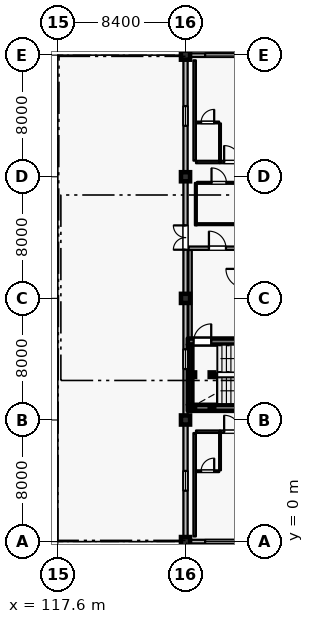
"""IFC4 building model, lengths in metres.
Left out: names, types, materials, properties, quantities, classifications, styles, units other than length and angle.
Written with IfcOpenShell. Run it as: python <this file> out.ifc"""

import sys

from ifc_helpers import new_model, si_unit, direction, frame, frame_2d, origin, origin_2d, place, context, subcontext, project, spatial, rectangle, hollow_rectangle, extrude, element, fill, save


model = new_model("IFC4")
c1 = context("Model", 3, precision=1e-05, world=origin(), true_north=direction((0.0, 1.0)))
c2 = subcontext(c1, "Body", "Model", "MODEL_VIEW")
j1 = project(units=[si_unit("LENGTHUNIT", "METRE"), si_unit("PLANEANGLEUNIT", "RADIAN")], contexts=[c1])
p1 = place(None, origin())
s1 = spatial("IfcSite", under=j1, at=p1, CompositionType="ELEMENT")
p2 = place(p1, origin())
s2 = spatial("IfcBuilding", under=s1, at=p2, CompositionType="ELEMENT")
p3 = place(p2, frame((0.0, 0.0, 43.2)))
s3 = spatial("IfcBuildingStorey", under=s2, at=p3, CompositionType="ELEMENT", Elevation=43.2)
for number, where, z_axis, x_axis in (
    (1, (126.0, 0.0, 0.0), (0.0, 0.0, 1.0), (1.0, 0.0, 0.0)),
    (2, (126.0, 16.0, 0.0), (0.0, 0.0, 1.0), (1.0, 0.0, 0.0)),
    (3, (126.0, 32.0, 0.0), (0.0, 0.0, 1.0), (1.0, 0.0, 0.0)),
    (4, (126.0, 8.0, 0.0), (0.0, 0.0, 1.0), (1.0, 0.0, 0.0)),
    (5, (126.0, 24.0, 0.0), (0.0, 0.0, 1.0), (1.0, 0.0, 0.0)),
):
    element("IfcColumn", number, at=place(p3, frame(where, z_axis=z_axis, x_axis=x_axis)), inside=s3, PredefinedType="COLUMN", context=c2, shape_type="SweptSolid", body=[
        extrude(rectangle(XDim=0.6, YDim=0.6, at=origin_2d()), origin(), (0.0, 0.0, 1.0), 4.2),
    ])
p4 = place(p3, frame((134.1, 0.0, 0.0), z_axis=(0.0, 0.0, 1.0), x_axis=(-1.0, 0.0, 0.0)))
e6 = element("IfcWall", 6, at=p4, inside=s3, PredefinedType="SOLIDWALL", context=c2, shape_type="SweptSolid", body=[
    extrude(rectangle(XDim=7.8, YDim=0.24, at=frame_2d((3.9, 0.0))), origin(), (0.0, 0.0, 1.0), 3.54),
])
p5 = place(p4, frame((1.675, 0.0, 0.0)))
e7 = element("IfcOpeningElement", 7, at=p5, cuts=e6, PredefinedType="OPENING", context=c2, shape_type="SweptSolid", body=[
    extrude(rectangle(XDim=1.5, YDim=2.25, at=frame_2d((0.75, 1.125))), frame((0.0, 0.13, 0.0), z_axis=(0.0, -1.0, 0.0), x_axis=(1.0, 0.0, 0.0)), (0.0, 0.0, 1.0), 0.26),
])
p6 = place(p4, frame((4.81, 0.0, 0.8)))
e8 = element("IfcOpeningElement", 8, at=p6, cuts=e6, PredefinedType="OPENING", context=c2, shape_type="SweptSolid", body=[
    extrude(rectangle(XDim=2.0, YDim=1.75, at=frame_2d((1.0, 0.875))), frame((0.0, 0.13, 0.0), z_axis=(0.0, -1.0, 0.0), x_axis=(1.0, 0.0, 0.0)), (0.0, 0.0, 1.0), 0.26),
])
p7 = place(p3, frame((126.3, 32.0, 0.0), z_axis=(0.0, 0.0, 1.0), x_axis=(1.0, 0.0, 0.0)))
e9 = element("IfcWall", 9, at=p7, inside=s3, PredefinedType="SOLIDWALL", context=c2, shape_type="SweptSolid", body=[
    extrude(rectangle(XDim=7.8, YDim=0.24, at=frame_2d((3.9, 0.0))), origin(), (0.0, 0.0, 1.0), 3.54),
])
p8 = place(p7, frame((0.99, 0.0, 0.8)))
e10 = element("IfcOpeningElement", 10, at=p8, cuts=e9, PredefinedType="OPENING", context=c2, shape_type="SweptSolid", body=[
    extrude(rectangle(XDim=2.0, YDim=1.75, at=frame_2d((1.0, 0.875))), frame((0.0, 0.13, 0.0), z_axis=(0.0, -1.0, 0.0), x_axis=(1.0, 0.0, 0.0)), (0.0, 0.0, 1.0), 0.26),
])
p9 = place(p7, frame((4.375, 0.0, 0.8)))
e11 = element("IfcOpeningElement", 11, at=p9, cuts=e9, PredefinedType="OPENING", context=c2, shape_type="SweptSolid", body=[
    extrude(rectangle(XDim=2.0, YDim=1.75, at=frame_2d((1.0, 0.875))), frame((0.0, 0.13, 0.0), z_axis=(0.0, -1.0, 0.0), x_axis=(1.0, 0.0, 0.0)), (0.0, 0.0, 1.0), 0.26),
])
p10 = place(p3, frame((126.0, 0.3, 0.0), z_axis=(0.0, 0.0, 1.0), x_axis=(0.0, 1.0, 0.0)))
e12 = element("IfcWall", 12, at=p10, inside=s3, PredefinedType="SOLIDWALL", context=c2, shape_type="SweptSolid", body=[
    extrude(rectangle(XDim=7.4, YDim=0.28, at=frame_2d((3.7, 0.0))), origin(), (0.0, 0.0, 1.0), 3.3),
])
p11 = place(p10, frame((3.05, 0.0, 0.75)))
e13 = element("IfcOpeningElement", 13, at=p11, cuts=e12, PredefinedType="OPENING", context=c2, shape_type="SweptSolid", body=[
    extrude(rectangle(XDim=1.3, YDim=1.65, at=frame_2d((0.65, 0.825))), frame((0.0, 0.15, 0.0), z_axis=(0.0, -1.0, 0.0), x_axis=(1.0, 0.0, 0.0)), (0.0, 0.0, 1.0), 0.3),
])
p12 = place(p3, frame((126.0, 8.3, 0.0), z_axis=(0.0, 0.0, 1.0), x_axis=(0.0, 1.0, 0.0)))
e14 = element("IfcWall", 14, at=p12, inside=s3, PredefinedType="SOLIDWALL", context=c2, shape_type="SweptSolid", body=[
    extrude(rectangle(XDim=7.4, YDim=0.28, at=frame_2d((3.7, 0.0))), origin(), (0.0, 0.0, 1.0), 3.3),
])
p13 = place(p12, frame((3.05, 0.0, 0.75)))
e15 = element("IfcOpeningElement", 15, at=p13, cuts=e14, PredefinedType="OPENING", context=c2, shape_type="SweptSolid", body=[
    extrude(rectangle(XDim=1.3, YDim=1.65, at=frame_2d((0.65, 0.825))), frame((0.0, 0.15, 0.0), z_axis=(0.0, -1.0, 0.0), x_axis=(1.0, 0.0, 0.0)), (0.0, 0.0, 1.0), 0.3),
])
p14 = place(p3, frame((126.0, 16.3, 0.0), z_axis=(0.0, 0.0, 1.0), x_axis=(0.0, 1.0, 0.0)))
e16 = element("IfcWall", 16, at=p14, inside=s3, PredefinedType="SOLIDWALL", context=c2, shape_type="SweptSolid", body=[
    extrude(rectangle(XDim=7.4, YDim=0.28, at=frame_2d((3.7, 0.0))), origin(), (0.0, 0.0, 1.0), 3.3),
])
p15 = place(p14, frame((2.9, 0.0, 0.0)))
e17 = element("IfcOpeningElement", 17, at=p15, cuts=e16, PredefinedType="OPENING", context=c2, shape_type="SweptSolid", body=[
    extrude(rectangle(XDim=1.6, YDim=2.25, at=frame_2d((0.8, 1.125))), frame((0.0, 0.15, 0.0), z_axis=(0.0, -1.0, 0.0), x_axis=(1.0, 0.0, 0.0)), (0.0, 0.0, 1.0), 0.3),
])
p16 = place(p3, frame((126.0, 24.3, 0.0), z_axis=(0.0, 0.0, 1.0), x_axis=(0.0, 1.0, 0.0)))
e18 = element("IfcWall", 18, at=p16, inside=s3, PredefinedType="SOLIDWALL", context=c2, shape_type="SweptSolid", body=[
    extrude(rectangle(XDim=7.4, YDim=0.28, at=frame_2d((3.7, 0.0))), origin(), (0.0, 0.0, 1.0), 3.3),
])
p17 = place(p16, frame((3.05, 0.0, 0.75)))
e19 = element("IfcOpeningElement", 19, at=p17, cuts=e18, PredefinedType="OPENING", context=c2, shape_type="SweptSolid", body=[
    extrude(rectangle(XDim=1.3, YDim=1.65, at=frame_2d((0.65, 0.825))), frame((0.0, 0.15, 0.0), z_axis=(0.0, -1.0, 0.0), x_axis=(1.0, 0.0, 0.0)), (0.0, 0.0, 1.0), 0.3),
])
p18 = place(p3, frame((126.15, 8.8, 0.0), z_axis=(0.0, 0.0, 1.0), x_axis=(1.0, 0.0, 0.0)))
e20 = element("IfcWall", 20, at=p18, inside=s3, PredefinedType="SHEAR", context=c2, shape_type="SweptSolid", body=[
    extrude(rectangle(XDim=8.15, YDim=0.4, at=frame_2d((4.075, 0.0))), origin(), (0.0, 0.0, 1.0), 3.935),
])
p19 = place(p3, frame((126.15, 13.16, 0.0), z_axis=(0.0, 0.0, 1.0), x_axis=(1.0, 0.0, 0.0)))
e21 = element("IfcWall", 21, at=p19, inside=s3, PredefinedType="SHEAR", context=c2, shape_type="SweptSolid", body=[
    extrude(rectangle(XDim=8.15, YDim=0.4, at=frame_2d((4.075, 0.0))), origin(), (0.0, 0.0, 1.0), 3.935),
])
p20 = place(p19, frame((0.38, 0.0, 0.0)))
e22 = element("IfcOpeningElement", 22, at=p20, cuts=e21, PredefinedType="OPENING", context=c2, shape_type="SweptSolid", body=[
    extrude(rectangle(XDim=1.16, YDim=2.2, at=frame_2d((0.58, 1.1))), frame((0.0, 0.21, 0.0), z_axis=(0.0, -1.0, 0.0), x_axis=(1.0, 0.0, 0.0)), (0.0, 0.0, 1.0), 0.42),
])
p21 = place(p3, frame((126.3, 9.005, 0.0), z_axis=(0.0, 0.0, 1.0), x_axis=(0.0, 1.0, 0.0)))
e23 = element("IfcWall", 23, at=p21, inside=s3, PredefinedType="SHEAR", context=c2, shape_type="SweptSolid", body=[
    extrude(rectangle(XDim=3.95, YDim=0.3, at=frame_2d((1.975, 0.0))), origin(), (0.0, 0.0, 1.0), 3.935),
])
p22 = place(p3, frame((126.3, 13.365, 0.0), z_axis=(0.0, 0.0, 1.0), x_axis=(0.0, 1.0, 0.0)))
e24 = element("IfcWall", 24, at=p22, inside=s3, PredefinedType="PARTITIONING", context=c2, shape_type="SweptSolid", body=[
    extrude(rectangle(XDim=5.82, YDim=0.22, at=frame_2d((2.91, 0.0))), origin(), (0.0, 0.0, 1.0), 3.935),
])
p23 = place(p3, frame((126.19, 19.3, 0.0), z_axis=(0.0, 0.0, 1.0), x_axis=(1.0, 0.0, 0.0)))
e25 = element("IfcWall", 25, at=p23, inside=s3, PredefinedType="PARTITIONING", context=c2, shape_type="SweptSolid", body=[
    extrude(rectangle(XDim=3.82, YDim=0.22, at=frame_2d((1.91, 0.0))), origin(), (0.0, 0.0, 1.0), 3.935),
])
p24 = place(p23, frame((1.35, 0.0, 0.0)))
e26 = element("IfcOpeningElement", 26, at=p24, cuts=e25, PredefinedType="OPENING", context=c2, shape_type="SweptSolid", body=[
    extrude(rectangle(XDim=1.12, YDim=2.2, at=frame_2d((0.56, 1.1))), frame((0.0, 0.12, 0.0), z_axis=(0.0, -1.0, 0.0), x_axis=(1.0, 0.0, 0.0)), (0.0, 0.0, 1.0), 0.24),
])
for number, where, z_axis, x_axis in (
    (27, (126.48, 8.8, 0.0), (0.0, 0.0, 1.0), (1.0, 0.0, 0.0)),
    (28, (126.48, 10.98, 0.0), (0.0, 0.0, 1.0), (1.0, 0.0, 0.0)),
    (29, (127.74, 8.8, 0.0), (0.0, 0.0, 1.0), (1.0, 0.0, 0.0)),
    (30, (127.74, 10.98, 0.0), (0.0, 0.0, 1.0), (1.0, 0.0, 0.0)),
):
    element("IfcColumn", number, at=place(p3, frame(where, z_axis=z_axis, x_axis=x_axis)), inside=s3, PredefinedType="COLUMN", context=c2, shape_type="SweptSolid", body=[
        extrude(hollow_rectangle(XDim=0.3, YDim=0.3, WallThickness=0.012, at=origin_2d()), origin(), (0.0, 0.0, 1.0), 4.02),
    ])
p25 = place(p3, frame((126.69, 24.97, 0.0), z_axis=(0.0, 0.0, 1.0), x_axis=(1.0, 0.0, 0.0)))
e31 = element("IfcWall", 31, at=p25, inside=s3, PredefinedType="PARTITIONING", context=c2, shape_type="SweptSolid", body=[
    extrude(rectangle(XDim=1.57, YDim=0.16, at=frame_2d((0.785, 0.0))), origin(), (0.0, 0.0, 1.0), 3.935),
])
p26 = place(p3, frame((128.27, 24.97, 0.0), z_axis=(0.0, 0.0, 1.0), x_axis=(1.0, 0.0, 0.0)))
e32 = element("IfcWall", 32, at=p26, inside=s3, PredefinedType="PARTITIONING", context=c2, shape_type="SweptSolid", body=[
    extrude(rectangle(XDim=1.62, YDim=0.16, at=frame_2d((0.81, 0.0))), origin(), (0.0, 0.0, 1.0), 3.935),
])
p27 = place(p26, frame((0.27, 0.0, 0.0)))
e33 = element("IfcOpeningElement", 33, at=p27, cuts=e32, PredefinedType="OPENING", context=c2, shape_type="SweptSolid", body=[
    extrude(rectangle(XDim=1.08, YDim=2.3, at=frame_2d((0.54, 1.15))), frame((0.0, 0.09, 0.0), z_axis=(0.0, -1.0, 0.0), x_axis=(1.0, 0.0, 0.0)), (0.0, 0.0, 1.0), 0.18),
])
p28 = place(p3, frame((128.27, 25.06, 0.0), z_axis=(0.0, 0.0, 1.0), x_axis=(0.0, 1.0, 0.0)))
e34 = element("IfcWall", 34, at=p28, inside=s3, PredefinedType="PARTITIONING", context=c2, shape_type="SweptSolid", body=[
    extrude(rectangle(XDim=2.45, YDim=0.115, at=frame_2d((1.225, 0.0))), origin(), (0.0, 0.0, 1.0), 3.935),
])
p29 = place(p3, frame((126.7, 27.57, 0.0), z_axis=(0.0, 0.0, 1.0), x_axis=(1.0, 0.0, 0.0)))
e35 = element("IfcWall", 35, at=p29, inside=s3, PredefinedType="PARTITIONING", context=c2, shape_type="SweptSolid", body=[
    extrude(rectangle(XDim=1.51, YDim=0.115, at=frame_2d((0.755, 0.0))), origin(), (0.0, 0.0, 1.0), 3.935),
])
p30 = place(p29, frame((0.325, 0.0, 0.0)))
e36 = element("IfcOpeningElement", 36, at=p30, cuts=e35, PredefinedType="OPENING", context=c2, shape_type="SweptSolid", body=[
    extrude(rectangle(XDim=0.86, YDim=2.12, at=frame_2d((0.43, 1.06))), frame((0.0, 0.067, 0.0), z_axis=(0.0, -1.0, 0.0), x_axis=(1.0, 0.0, 0.0)), (0.0, 0.0, 1.0), 0.135),
])
p31 = place(p3, frame((126.6, 25.06, 0.0), z_axis=(0.0, 0.0, 1.0), x_axis=(0.0, 1.0, 0.0)))
e37 = element("IfcWall", 37, at=p31, inside=s3, PredefinedType="PARTITIONING", context=c2, shape_type="SweptSolid", body=[
    extrude(rectangle(XDim=6.6, YDim=0.16, at=frame_2d((3.3, 0.0))), origin(), (0.0, 0.0, 1.0), 3.935),
])
p32 = place(p3, frame((126.69, 7.23, 0.0), z_axis=(0.0, 0.0, 1.0), x_axis=(1.0, 0.0, 0.0)))
e38 = element("IfcWall", 38, at=p32, inside=s3, PredefinedType="PARTITIONING", context=c2, shape_type="SweptSolid", body=[
    extrude(rectangle(XDim=1.57, YDim=0.16, at=frame_2d((0.785, 0.0))), origin(), (0.0, 0.0, 1.0), 3.935),
])
p33 = place(p3, frame((128.27, 7.23, 0.0), z_axis=(0.0, 0.0, 1.0), x_axis=(1.0, 0.0, 0.0)))
e39 = element("IfcWall", 39, at=p33, inside=s3, PredefinedType="PARTITIONING", context=c2, shape_type="SweptSolid", body=[
    extrude(rectangle(XDim=1.62, YDim=0.16, at=frame_2d((0.81, 0.0))), origin(), (0.0, 0.0, 1.0), 3.935),
])
p34 = place(p33, frame((0.27, 0.0, 0.0)))
e40 = element("IfcOpeningElement", 40, at=p34, cuts=e39, PredefinedType="OPENING", context=c2, shape_type="SweptSolid", body=[
    extrude(rectangle(XDim=1.08, YDim=2.3, at=frame_2d((0.54, 1.15))), frame((0.0, 0.09, 0.0), z_axis=(0.0, -1.0, 0.0), x_axis=(1.0, 0.0, 0.0)), (0.0, 0.0, 1.0), 0.18),
])
p35 = place(p3, frame((128.27, 4.69, 0.0), z_axis=(0.0, 0.0, 1.0), x_axis=(0.0, 1.0, 0.0)))
e41 = element("IfcWall", 41, at=p35, inside=s3, PredefinedType="PARTITIONING", context=c2, shape_type="SweptSolid", body=[
    extrude(rectangle(XDim=2.45, YDim=0.115, at=frame_2d((1.225, 0.0))), origin(), (0.0, 0.0, 1.0), 3.935),
])
p36 = place(p3, frame((126.7, 4.63, 0.0), z_axis=(0.0, 0.0, 1.0), x_axis=(1.0, 0.0, 0.0)))
e42 = element("IfcWall", 42, at=p36, inside=s3, PredefinedType="PARTITIONING", context=c2, shape_type="SweptSolid", body=[
    extrude(rectangle(XDim=1.51, YDim=0.115, at=frame_2d((0.755, 0.0))), origin(), (0.0, 0.0, 1.0), 3.935),
])
p37 = place(p36, frame((0.325, 0.0, 0.0)))
e43 = element("IfcOpeningElement", 43, at=p37, cuts=e42, PredefinedType="OPENING", context=c2, shape_type="SweptSolid", body=[
    extrude(rectangle(XDim=0.86, YDim=2.12, at=frame_2d((0.43, 1.06))), frame((0.0, 0.067, 0.0), z_axis=(0.0, -1.0, 0.0), x_axis=(1.0, 0.0, 0.0)), (0.0, 0.0, 1.0), 0.135),
])
p38 = place(p3, frame((126.6, 0.34, 0.0), z_axis=(0.0, 0.0, 1.0), x_axis=(0.0, 1.0, 0.0)))
e44 = element("IfcWall", 44, at=p38, inside=s3, PredefinedType="PARTITIONING", context=c2, shape_type="SweptSolid", body=[
    extrude(rectangle(XDim=6.8, YDim=0.16, at=frame_2d((3.4, 0.0))), origin(), (0.0, 0.0, 1.0), 3.935),
])
p39 = place(p3, frame((126.76, 23.6, 0.0), z_axis=(0.0, 0.0, 1.0), x_axis=(1.0, 0.0, 0.0)))
e45 = element("IfcWall", 45, at=p39, inside=s3, PredefinedType="PARTITIONING", context=c2, shape_type="SweptSolid", body=[
    extrude(rectangle(XDim=2.88, YDim=0.125, at=frame_2d((1.44, 0.0))), origin(), (0.0, 0.0, 1.0), 3.935),
])
p40 = place(p39, frame((0.95, 0.0, 0.0)))
e46 = element("IfcOpeningElement", 46, at=p40, cuts=e45, PredefinedType="OPENING", context=c2, shape_type="SweptSolid", body=[
    extrude(rectangle(XDim=0.98, YDim=2.15, at=frame_2d((0.49, 1.075))), frame((0.0, 0.073, 0.0), z_axis=(0.0, -1.0, 0.0), x_axis=(1.0, 0.0, 0.0)), (0.0, 0.0, 1.0), 0.145),
])
p41 = place(p3, frame((126.68, 20.8, 0.0), z_axis=(0.0, 0.0, 1.0), x_axis=(0.0, 1.0, 0.0)))
e47 = element("IfcWall", 47, at=p41, inside=s3, PredefinedType="PARTITIONING", context=c2, shape_type="SweptSolid", body=[
    extrude(rectangle(XDim=2.796, YDim=0.125, at=frame_2d((1.398, 0.0))), origin(), (0.0, 0.0, 1.0), 3.935),
])
p42 = place(p3, frame((126.742, 20.88, 0.0), z_axis=(0.0, 0.0, 1.0), x_axis=(1.0, 0.0, 0.0)))
e48 = element("IfcWall", 48, at=p42, inside=s3, PredefinedType="PARTITIONING", context=c2, shape_type="SweptSolid", body=[
    extrude(rectangle(XDim=2.915, YDim=0.125, at=frame_2d((1.458, 0.0))), origin(), (0.0, 0.0, 1.0), 3.935),
])
p43 = place(p6, origin())
e49 = element("IfcWindow", 49, at=p43, inside=s3, PartitioningType="DOUBLE_PANEL_VERTICAL", PredefinedType="WINDOW", context=c2, shape_type="SweptSolid", body=[
    extrude(rectangle(XDim=2.0, YDim=1.75, at=frame_2d((1.0, 0.875))), frame((0.0, 0.03, 0.0), z_axis=(0.0, -1.0, 0.0), x_axis=(1.0, 0.0, 0.0)), (0.0, 0.0, 1.0), 0.06),
])
fill(e8, e49)
p44 = place(p8, origin())
e50 = element("IfcWindow", 50, at=p44, inside=s3, PartitioningType="DOUBLE_PANEL_VERTICAL", PredefinedType="WINDOW", context=c2, shape_type="SweptSolid", body=[
    extrude(rectangle(XDim=2.0, YDim=1.75, at=frame_2d((1.0, 0.875))), frame((0.0, 0.03, 0.0), z_axis=(0.0, -1.0, 0.0), x_axis=(1.0, 0.0, 0.0)), (0.0, 0.0, 1.0), 0.06),
])
fill(e10, e50)
p45 = place(p11, origin())
e51 = element("IfcWindow", 51, at=p45, inside=s3, PartitioningType="SINGLE_PANEL", PredefinedType="WINDOW", context=c2, shape_type="SweptSolid", body=[
    extrude(rectangle(XDim=1.3, YDim=1.65, at=frame_2d((0.65, 0.825))), frame((0.0, 0.03, 0.0), z_axis=(0.0, -1.0, 0.0), x_axis=(1.0, 0.0, 0.0)), (0.0, 0.0, 1.0), 0.06),
])
fill(e13, e51)
p46 = place(p13, origin())
e52 = element("IfcWindow", 52, at=p46, inside=s3, PartitioningType="SINGLE_PANEL", PredefinedType="WINDOW", context=c2, shape_type="SweptSolid", body=[
    extrude(rectangle(XDim=1.3, YDim=1.65, at=frame_2d((0.65, 0.825))), frame((0.0, 0.03, 0.0), z_axis=(0.0, -1.0, 0.0), x_axis=(1.0, 0.0, 0.0)), (0.0, 0.0, 1.0), 0.06),
])
fill(e15, e52)
p47 = place(p15, origin())
e53 = element("IfcDoor", 53, at=p47, inside=s3, OperationType="DOUBLE_DOOR_SINGLE_SWING", PredefinedType="DOOR", context=c2, shape_type="SweptSolid", body=[
    extrude(rectangle(XDim=1.6, YDim=2.25, at=frame_2d((0.8, 1.125))), frame((0.0, 0.025, 0.0), z_axis=(0.0, -1.0, 0.0), x_axis=(1.0, 0.0, 0.0)), (0.0, 0.0, 1.0), 0.05),
])
fill(e17, e53)
p48 = place(p17, origin())
e54 = element("IfcWindow", 54, at=p48, inside=s3, PartitioningType="SINGLE_PANEL", PredefinedType="WINDOW", context=c2, shape_type="SweptSolid", body=[
    extrude(rectangle(XDim=1.3, YDim=1.65, at=frame_2d((0.65, 0.825))), frame((0.0, 0.03, 0.0), z_axis=(0.0, -1.0, 0.0), x_axis=(1.0, 0.0, 0.0)), (0.0, 0.0, 1.0), 0.06),
])
fill(e19, e54)
p49 = place(p20, origin())
e55 = element("IfcDoor", 55, at=p49, inside=s3, OperationType="SINGLE_SWING_RIGHT", PredefinedType="DOOR", context=c2, shape_type="SweptSolid", body=[
    extrude(rectangle(XDim=1.16, YDim=2.2, at=frame_2d((0.58, 1.1))), frame((0.0, 0.025, 0.0), z_axis=(0.0, -1.0, 0.0), x_axis=(1.0, 0.0, 0.0)), (0.0, 0.0, 1.0), 0.05),
])
fill(e22, e55)
p50 = place(p24, origin())
e56 = element("IfcDoor", 56, at=p50, inside=s3, OperationType="SINGLE_SWING_LEFT", PredefinedType="DOOR", context=c2, shape_type="SweptSolid", body=[
    extrude(rectangle(XDim=1.12, YDim=2.2, at=frame_2d((0.56, 1.1))), frame((0.0, 0.025, 0.0), z_axis=(0.0, -1.0, 0.0), x_axis=(1.0, 0.0, 0.0)), (0.0, 0.0, 1.0), 0.05),
])
fill(e26, e56)
p51 = place(p27, origin())
e57 = element("IfcDoor", 57, at=p51, inside=s3, OperationType="SINGLE_SWING_LEFT", PredefinedType="DOOR", context=c2, shape_type="SweptSolid", body=[
    extrude(rectangle(XDim=1.08, YDim=2.3, at=frame_2d((0.54, 1.15))), frame((0.0, 0.025, 0.0), z_axis=(0.0, -1.0, 0.0), x_axis=(1.0, 0.0, 0.0)), (0.0, 0.0, 1.0), 0.05),
])
fill(e33, e57)
p52 = place(p30, origin())
e58 = element("IfcDoor", 58, at=p52, inside=s3, OperationType="SINGLE_SWING_RIGHT", PredefinedType="DOOR", context=c2, shape_type="SweptSolid", body=[
    extrude(rectangle(XDim=0.86, YDim=2.12, at=frame_2d((0.43, 1.06))), frame((0.0, 0.025, 0.0), z_axis=(0.0, -1.0, 0.0), x_axis=(1.0, 0.0, 0.0)), (0.0, 0.0, 1.0), 0.05),
])
fill(e36, e58)
p53 = place(p34, origin())
e59 = element("IfcDoor", 59, at=p53, inside=s3, OperationType="SINGLE_SWING_LEFT", PredefinedType="DOOR", context=c2, shape_type="SweptSolid", body=[
    extrude(rectangle(XDim=1.08, YDim=2.3, at=frame_2d((0.54, 1.15))), frame((0.0, 0.025, 0.0), z_axis=(0.0, -1.0, 0.0), x_axis=(1.0, 0.0, 0.0)), (0.0, 0.0, 1.0), 0.05),
])
fill(e40, e59)
p54 = place(p37, origin())
e60 = element("IfcDoor", 60, at=p54, inside=s3, OperationType="SINGLE_SWING_RIGHT", PredefinedType="DOOR", context=c2, shape_type="SweptSolid", body=[
    extrude(rectangle(XDim=0.86, YDim=2.12, at=frame_2d((0.43, 1.06))), frame((0.0, 0.025, 0.0), z_axis=(0.0, -1.0, 0.0), x_axis=(1.0, 0.0, 0.0)), (0.0, 0.0, 1.0), 0.05),
])
fill(e43, e60)
p55 = place(p40, origin())
e61 = element("IfcDoor", 61, at=p55, inside=s3, OperationType="SINGLE_SWING_LEFT", PredefinedType="DOOR", context=c2, shape_type="SweptSolid", body=[
    extrude(rectangle(XDim=0.98, YDim=2.15, at=frame_2d((0.49, 1.075))), frame((0.0, 0.025, 0.0), z_axis=(0.0, -1.0, 0.0), x_axis=(1.0, 0.0, 0.0)), (0.0, 0.0, 1.0), 0.05),
])
fill(e46, e61)
save(model, sys.argv[1])
